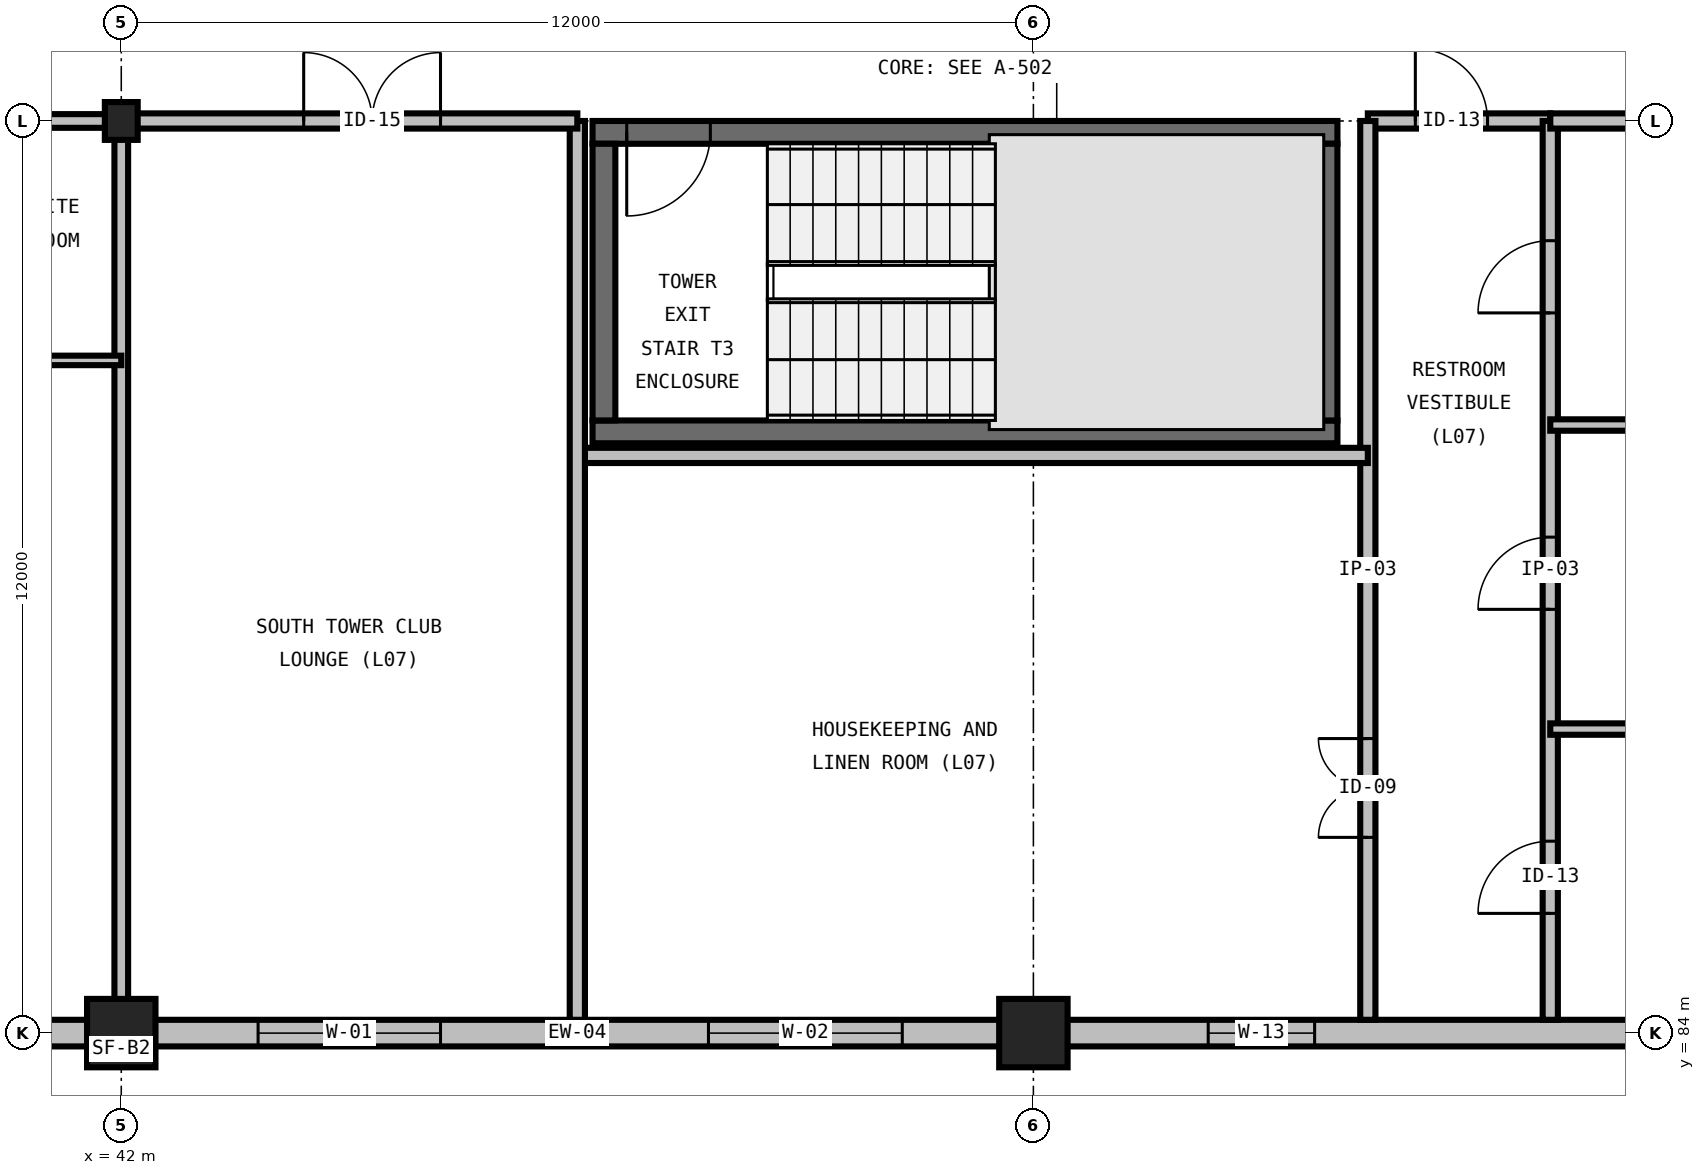
"""IFC4 building model, lengths in metres.
Left out: names, types, materials, properties, quantities, classifications, styles, units other than length and angle.
Written with IfcOpenShell. Run it as: python <this file> out.ifc"""

import sys

from ifc_helpers import new_model, si_unit, direction, frame, frame_2d, origin, origin_2d, place, context, subcontext, project, spatial, rectangle, i_section, extrude, element, fill, save


model = new_model("IFC4")
c1 = context("Model", 3, precision=1e-05, world=origin(), true_north=direction((0.0, 1.0)))
c2 = subcontext(c1, "Body", "Model", "MODEL_VIEW")
j1 = project(units=[si_unit("LENGTHUNIT", "METRE"), si_unit("PLANEANGLEUNIT", "RADIAN")], contexts=[c1])
p1 = place(None, origin())
s1 = spatial("IfcSite", under=j1, at=p1, CompositionType="ELEMENT")
p2 = place(p1, origin())
s2 = spatial("IfcBuilding", under=s1, at=p2, CompositionType="ELEMENT")
p3 = place(p2, frame((0.0, 0.0, 34.8)))
s3 = spatial("IfcBuildingStorey", under=s2, at=p3, CompositionType="ELEMENT", Elevation=34.8)
p4 = place(p3, frame((42.0, 84.0, 0.0), z_axis=(0.0, 0.0, 1.0), x_axis=(1.0, 0.0, 0.0)))
e1 = element("IfcColumn", 1, at=p4, inside=s3, PredefinedType="COLUMN", context=c2, shape_type="SweptSolid", body=[
    extrude(rectangle(XDim=0.9, YDim=0.9, at=origin_2d()), origin(), (0.0, 0.0, 1.0), 3.6),
])
p5 = place(p3, frame((42.0, 96.0, 0.0), z_axis=(0.0, 0.0, 1.0), x_axis=(1.0, 0.0, 0.0)))
e2 = element("IfcColumn", 2, at=p5, inside=s3, PredefinedType="COLUMN", context=c2, shape_type="SweptSolid", body=[
    extrude(i_section(OverallWidth=0.432, OverallDepth=0.498, WebThickness=0.056, FlangeThickness=0.089, FilletRadius=0.031, at=origin_2d()), origin(), (0.0, 0.0, 1.0), 3.6),
])
p6 = place(p3, frame((54.0, 84.0, 0.0), z_axis=(0.0, 0.0, 1.0), x_axis=(1.0, 0.0, 0.0)))
e3 = element("IfcColumn", 3, at=p6, inside=s3, PredefinedType="COLUMN", context=c2, shape_type="SweptSolid", body=[
    extrude(rectangle(XDim=0.9, YDim=0.9, at=origin_2d()), origin(), (0.0, 0.0, 1.0), 3.6),
])
p7 = place(p3, frame((48.2, 91.91, 0.0), z_axis=(0.0, 0.0, 1.0), x_axis=(1.0, 0.0, 0.0)))
e4 = element("IfcWall", 4, at=p7, inside=s3, PredefinedType="SHEAR", context=c2, shape_type="SweptSolid", body=[
    extrude(rectangle(XDim=9.8, YDim=0.3, at=frame_2d((4.9, 0.0))), origin(), (0.0, 0.0, 1.0), 3.6),
])
p8 = place(p3, frame((58.0, 95.85, 0.0), z_axis=(0.0, 0.0, 1.0), x_axis=(-1.0, 0.0, 0.0)))
e5 = element("IfcWall", 5, at=p8, inside=s3, PredefinedType="SHEAR", context=c2, shape_type="SweptSolid", body=[
    extrude(rectangle(XDim=9.8, YDim=0.3, at=frame_2d((4.9, 0.0))), origin(), (0.0, 0.0, 1.0), 3.6),
])
p9 = place(p8, frame((8.25, 0.0, 0.0)))
e6 = element("IfcOpeningElement", 6, at=p9, cuts=e5, PredefinedType="OPENING", context=c2, shape_type="SweptSolid", body=[
    extrude(rectangle(XDim=1.1, YDim=2.2, at=frame_2d((0.55, 1.1))), frame((0.0, 0.165, 0.0), z_axis=(0.0, -1.0, 0.0), x_axis=(1.0, 0.0, 0.0)), (0.0, 0.0, 1.0), 0.33),
])
for number, where, z_axis, x_axis in (
    (7, (48.35, 95.7, 0.0), (0.0, 0.0, 1.0), (0.0, -1.0, 0.0)),
    (8, (57.85, 92.06, 0.0), (0.0, 0.0, 1.0), (0.0, 1.0, 0.0)),
):
    element("IfcWall", number, at=place(p3, frame(where, z_axis=z_axis, x_axis=x_axis)), inside=s3, PredefinedType="SHEAR", context=c2, shape_type="SweptSolid", body=[
        extrude(rectangle(XDim=3.64, YDim=0.3, at=frame_2d((1.82, 0.0))), origin(), (0.0, 0.0, 1.0), 3.6),
    ])
p10 = place(p3, frame((36.0, 84.0, 0.0), z_axis=(0.0, 0.0, 1.0), x_axis=(1.0, 0.0, 0.0)))
e9 = element("IfcWall", 9, at=p10, inside=s3, PredefinedType="STANDARD", context=c2, shape_type="SweptSolid", body=[
    extrude(rectangle(XDim=6.0, YDim=0.35, at=frame_2d((3.0, 0.0))), origin(), (0.0, 0.0, 1.0), 2.486),
])
p11 = place(p10, frame((1.8, 0.0, 0.75)))
e10 = element("IfcOpeningElement", 10, at=p11, cuts=e9, PredefinedType="OPENING", context=c2, shape_type="SweptSolid", body=[
    extrude(rectangle(XDim=2.4, YDim=1.65, at=frame_2d((1.2, 0.825))), frame((0.0, 0.19, 0.0), z_axis=(0.0, -1.0, 0.0), x_axis=(1.0, 0.0, 0.0)), (0.0, 0.0, 1.0), 0.38),
])
p12 = place(p3, frame((42.0, 84.0, 0.0), z_axis=(0.0, 0.0, 1.0), x_axis=(1.0, 0.0, 0.0)))
e11 = element("IfcWall", 11, at=p12, inside=s3, PredefinedType="STANDARD", context=c2, shape_type="SweptSolid", body=[
    extrude(rectangle(XDim=12.0, YDim=0.35, at=frame_2d((6.0, 0.0))), origin(), (0.0, 0.0, 1.0), 2.486),
])
p13 = place(p12, frame((1.8, 0.0, 0.75)))
e12 = element("IfcOpeningElement", 12, at=p13, cuts=e11, PredefinedType="OPENING", context=c2, shape_type="SweptSolid", body=[
    extrude(rectangle(XDim=2.4, YDim=1.65, at=frame_2d((1.2, 0.825))), frame((0.0, 0.19, 0.0), z_axis=(0.0, -1.0, 0.0), x_axis=(1.0, 0.0, 0.0)), (0.0, 0.0, 1.0), 0.38),
])
p14 = place(p12, frame((7.725, 0.0, 0.75)))
e13 = element("IfcOpeningElement", 13, at=p14, cuts=e11, PredefinedType="OPENING", context=c2, shape_type="SweptSolid", body=[
    extrude(rectangle(XDim=2.55, YDim=1.65, at=frame_2d((1.275, 0.825))), frame((0.0, 0.19, 0.0), z_axis=(0.0, -1.0, 0.0), x_axis=(1.0, 0.0, 0.0)), (0.0, 0.0, 1.0), 0.38),
])
p15 = place(p3, frame((54.0, 84.0, 0.0), z_axis=(0.0, 0.0, 1.0), x_axis=(1.0, 0.0, 0.0)))
e14 = element("IfcWall", 14, at=p15, inside=s3, PredefinedType="STANDARD", context=c2, shape_type="SweptSolid", body=[
    extrude(rectangle(XDim=12.0, YDim=0.35, at=frame_2d((6.0, 0.0))), origin(), (0.0, 0.0, 1.0), 2.486),
])
p16 = place(p15, frame((2.3, 0.0, 1.0)))
e15 = element("IfcOpeningElement", 15, at=p16, cuts=e14, PredefinedType="OPENING", context=c2, shape_type="SweptSolid", body=[
    extrude(rectangle(XDim=1.4, YDim=1.4, at=frame_2d((0.7, 0.7))), frame((0.0, 0.19, 0.0), z_axis=(0.0, -1.0, 0.0), x_axis=(1.0, 0.0, 0.0)), (0.0, 0.0, 1.0), 0.38),
])
p17 = place(p15, frame((8.25, 0.0, 1.0)))
e16 = element("IfcOpeningElement", 16, at=p17, cuts=e14, PredefinedType="OPENING", context=c2, shape_type="SweptSolid", body=[
    extrude(rectangle(XDim=1.5, YDim=1.35, at=frame_2d((0.75, 0.675))), frame((0.0, 0.19, 0.0), z_axis=(0.0, -1.0, 0.0), x_axis=(1.0, 0.0, 0.0)), (0.0, 0.0, 1.0), 0.38),
])
p18 = place(p3, frame((58.4, 96.0, 0.0), z_axis=(0.0, 0.0, 1.0), x_axis=(1.0, 0.0, 0.0)))
e17 = element("IfcWall", 17, at=p18, inside=s3, PredefinedType="PARTITIONING", context=c2, shape_type="SweptSolid", body=[
    extrude(rectangle(XDim=2.4, YDim=0.2, at=frame_2d((1.2, 0.0))), origin(), (0.0, 0.0, 1.0), 2.359),
])
p19 = place(p18, frame((0.625, 0.0, 0.0)))
e18 = element("IfcOpeningElement", 18, at=p19, cuts=e17, PredefinedType="OPENING", context=c2, shape_type="SweptSolid", body=[
    extrude(rectangle(XDim=0.95, YDim=2.15, at=frame_2d((0.475, 1.075))), frame((0.0, 0.115, 0.0), z_axis=(0.0, -1.0, 0.0), x_axis=(1.0, 0.0, 0.0)), (0.0, 0.0, 1.0), 0.23),
])
p20 = place(p3, frame((58.4, 84.175, 0.0), z_axis=(0.0, 0.0, 1.0), x_axis=(0.0, 1.0, 0.0)))
e19 = element("IfcWall", 19, at=p20, inside=s3, PredefinedType="PARTITIONING", context=c2, shape_type="SweptSolid", body=[
    extrude(rectangle(XDim=11.825, YDim=0.2, at=frame_2d((5.913, 0.0))), origin(), (0.0, 0.0, 1.0), 3.29),
])
p21 = place(p20, frame((2.4, 0.0, 0.0)))
e20 = element("IfcOpeningElement", 20, at=p21, cuts=e19, PredefinedType="OPENING", context=c2, shape_type="SweptSolid", body=[
    extrude(rectangle(XDim=1.3, YDim=2.2, at=frame_2d((0.65, 1.1))), frame((0.0, 0.115, 0.0), z_axis=(0.0, -1.0, 0.0), x_axis=(1.0, 0.0, 0.0)), (0.0, 0.0, 1.0), 0.23),
])
p22 = place(p3, frame((60.8, 84.175, 0.0), z_axis=(0.0, 0.0, 1.0), x_axis=(0.0, 1.0, 0.0)))
e21 = element("IfcWall", 21, at=p22, inside=s3, PredefinedType="PARTITIONING", context=c2, shape_type="SweptSolid", body=[
    extrude(rectangle(XDim=11.825, YDim=0.2, at=frame_2d((5.913, 0.0))), origin(), (0.0, 0.0, 1.0), 3.29),
])
p23 = place(p22, frame((1.4, 0.0, 0.0)))
e22 = element("IfcOpeningElement", 22, at=p23, cuts=e21, PredefinedType="OPENING", context=c2, shape_type="SweptSolid", body=[
    extrude(rectangle(XDim=0.95, YDim=2.15, at=frame_2d((0.475, 1.075))), frame((0.0, 0.115, 0.0), z_axis=(0.0, -1.0, 0.0), x_axis=(1.0, 0.0, 0.0)), (0.0, 0.0, 1.0), 0.23),
])
p24 = place(p22, frame((5.4, 0.0, 0.0)))
e23 = element("IfcOpeningElement", 23, at=p24, cuts=e21, PredefinedType="OPENING", context=c2, shape_type="SweptSolid", body=[
    extrude(rectangle(XDim=0.95, YDim=2.15, at=frame_2d((0.475, 1.075))), frame((0.0, 0.115, 0.0), z_axis=(0.0, -1.0, 0.0), x_axis=(1.0, 0.0, 0.0)), (0.0, 0.0, 1.0), 0.23),
])
p25 = place(p22, frame((9.3, 0.0, 0.0)))
e24 = element("IfcOpeningElement", 24, at=p25, cuts=e21, PredefinedType="OPENING", context=c2, shape_type="SweptSolid", body=[
    extrude(rectangle(XDim=0.95, YDim=2.15, at=frame_2d((0.475, 1.075))), frame((0.0, 0.115, 0.0), z_axis=(0.0, -1.0, 0.0), x_axis=(1.0, 0.0, 0.0)), (0.0, 0.0, 1.0), 0.23),
])
p26 = place(p3, frame((60.8, 96.0, 0.0), z_axis=(0.0, 0.0, 1.0), x_axis=(1.0, 0.0, 0.0)))
e25 = element("IfcWall", 25, at=p26, inside=s3, PredefinedType="PARTITIONING", context=c2, shape_type="SweptSolid", body=[
    extrude(rectangle(XDim=5.2, YDim=0.2, at=frame_2d((2.6, 0.0))), origin(), (0.0, 0.0, 1.0), 2.359),
])
for number, where, z_axis, x_axis in (
    (26, (60.8, 88.0, 0.0), (0.0, 0.0, 1.0), (1.0, 0.0, 0.0)),
    (27, (60.8, 92.0, 0.0), (0.0, 0.0, 1.0), (1.0, 0.0, 0.0)),
):
    element("IfcWall", number, at=place(p3, frame(where, z_axis=z_axis, x_axis=x_axis)), inside=s3, PredefinedType="PARTITIONING", context=c2, shape_type="SweptSolid", body=[
        extrude(rectangle(XDim=5.2, YDim=0.15, at=frame_2d((2.6, 0.0))), origin(), (0.0, 0.0, 1.0), 3.29),
    ])
p27 = place(p3, frame((48.0, 91.6, 0.0), z_axis=(0.0, 0.0, 1.0), x_axis=(1.0, 0.0, 0.0)))
e28 = element("IfcWall", 28, at=p27, inside=s3, PredefinedType="PARTITIONING", context=c2, shape_type="SweptSolid", body=[
    extrude(rectangle(XDim=10.4, YDim=0.2, at=frame_2d((5.2, 0.0))), origin(), (0.0, 0.0, 1.0), 3.29),
])
p28 = place(p3, frame((48.0, 84.175, 0.0), z_axis=(0.0, 0.0, 1.0), x_axis=(0.0, 1.0, 0.0)))
e29 = element("IfcWall", 29, at=p28, inside=s3, PredefinedType="PARTITIONING", context=c2, shape_type="SweptSolid", body=[
    extrude(rectangle(XDim=11.825, YDim=0.2, at=frame_2d((5.913, 0.0))), origin(), (0.0, 0.0, 1.0), 3.29),
])
p29 = place(p3, frame((42.0, 96.0, 0.0), z_axis=(0.0, 0.0, 1.0), x_axis=(1.0, 0.0, 0.0)))
e30 = element("IfcWall", 30, at=p29, inside=s3, PredefinedType="PARTITIONING", context=c2, shape_type="SweptSolid", body=[
    extrude(rectangle(XDim=6.0, YDim=0.2, at=frame_2d((3.0, 0.0))), origin(), (0.0, 0.0, 1.0), 2.359),
])
p30 = place(p29, frame((2.4, 0.0, 0.0)))
e31 = element("IfcOpeningElement", 31, at=p30, cuts=e30, PredefinedType="OPENING", context=c2, shape_type="SweptSolid", body=[
    extrude(rectangle(XDim=1.8, YDim=2.3, at=frame_2d((0.9, 1.15))), frame((0.0, 0.115, 0.0), z_axis=(0.0, -1.0, 0.0), x_axis=(1.0, 0.0, 0.0)), (0.0, 0.0, 1.0), 0.23),
])
p31 = place(p3, frame((42.0, 84.175, 0.0), z_axis=(0.0, 0.0, 1.0), x_axis=(0.0, 1.0, 0.0)))
e32 = element("IfcWall", 32, at=p31, inside=s3, PredefinedType="PARTITIONING", context=c2, shape_type="SweptSolid", body=[
    extrude(rectangle(XDim=11.825, YDim=0.18, at=frame_2d((5.913, 0.0))), origin(), (0.0, 0.0, 1.0), 2.59),
])
p32 = place(p3, frame((36.0, 96.0, 0.0), z_axis=(0.0, 0.0, 1.0), x_axis=(1.0, 0.0, 0.0)))
e33 = element("IfcWall", 33, at=p32, inside=s3, PredefinedType="PARTITIONING", context=c2, shape_type="SweptSolid", body=[
    extrude(rectangle(XDim=6.0, YDim=0.18, at=frame_2d((3.0, 0.0))), origin(), (0.0, 0.0, 1.0), 2.736),
])
p33 = place(p32, frame((0.77, 0.0, 0.0)))
e34 = element("IfcOpeningElement", 34, at=p33, cuts=e33, PredefinedType="OPENING", context=c2, shape_type="SweptSolid", body=[
    extrude(rectangle(XDim=1.0, YDim=2.15, at=frame_2d((0.5, 1.075))), frame((0.0, 0.105, 0.0), z_axis=(0.0, -1.0, 0.0), x_axis=(1.0, 0.0, 0.0)), (0.0, 0.0, 1.0), 0.21),
])
p34 = place(p3, frame((39.48, 92.85, 0.0), z_axis=(0.0, 0.0, 1.0), x_axis=(1.0, 0.0, 0.0)))
e35 = element("IfcWall", 35, at=p34, inside=s3, PredefinedType="PARTITIONING", context=c2, shape_type="SweptSolid", body=[
    extrude(rectangle(XDim=2.52, YDim=0.125, at=frame_2d((1.26, 0.0))), origin(), (0.0, 0.0, 1.0), 3.29),
])
p35 = place(p9, origin())
e36 = element("IfcDoor", 36, at=p35, inside=s3, OperationType="SINGLE_SWING_RIGHT", PredefinedType="DOOR", context=c2, shape_type="SweptSolid", body=[
    extrude(rectangle(XDim=1.1, YDim=2.2, at=frame_2d((0.55, 1.1))), frame((0.0, 0.025, 0.0), z_axis=(0.0, -1.0, 0.0), x_axis=(1.0, 0.0, 0.0)), (0.0, 0.0, 1.0), 0.05),
])
fill(e6, e36)
p36 = place(p13, origin())
e37 = element("IfcWindow", 37, at=p36, inside=s3, PartitioningType="DOUBLE_PANEL_VERTICAL", PredefinedType="WINDOW", context=c2, shape_type="SweptSolid", body=[
    extrude(rectangle(XDim=2.4, YDim=1.65, at=frame_2d((1.2, 0.825))), frame((0.0, 0.03, 0.0), z_axis=(0.0, -1.0, 0.0), x_axis=(1.0, 0.0, 0.0)), (0.0, 0.0, 1.0), 0.06),
])
fill(e12, e37)
p37 = place(p14, origin())
e38 = element("IfcWindow", 38, at=p37, inside=s3, PartitioningType="DOUBLE_PANEL_VERTICAL", PredefinedType="WINDOW", context=c2, shape_type="SweptSolid", body=[
    extrude(rectangle(XDim=2.55, YDim=1.65, at=frame_2d((1.275, 0.825))), frame((0.0, 0.03, 0.0), z_axis=(0.0, -1.0, 0.0), x_axis=(1.0, 0.0, 0.0)), (0.0, 0.0, 1.0), 0.06),
])
fill(e13, e38)
p38 = place(p16, origin())
e39 = element("IfcWindow", 39, at=p38, inside=s3, PartitioningType="SINGLE_PANEL", PredefinedType="WINDOW", context=c2, shape_type="SweptSolid", body=[
    extrude(rectangle(XDim=1.4, YDim=1.4, at=frame_2d((0.7, 0.7))), frame((0.0, 0.03, 0.0), z_axis=(0.0, -1.0, 0.0), x_axis=(1.0, 0.0, 0.0)), (0.0, 0.0, 1.0), 0.06),
])
fill(e15, e39)
p39 = place(p19, origin())
e40 = element("IfcDoor", 40, at=p39, inside=s3, OperationType="SINGLE_SWING_LEFT", PredefinedType="DOOR", context=c2, shape_type="SweptSolid", body=[
    extrude(rectangle(XDim=0.95, YDim=2.15, at=frame_2d((0.475, 1.075))), frame((0.0, 0.025, 0.0), z_axis=(0.0, -1.0, 0.0), x_axis=(1.0, 0.0, 0.0)), (0.0, 0.0, 1.0), 0.05),
])
fill(e18, e40)
p40 = place(p21, origin())
e41 = element("IfcDoor", 41, at=p40, inside=s3, OperationType="DOUBLE_DOOR_SINGLE_SWING", PredefinedType="DOOR", context=c2, shape_type="SweptSolid", body=[
    extrude(rectangle(XDim=1.3, YDim=2.2, at=frame_2d((0.65, 1.1))), frame((0.0, 0.025, 0.0), z_axis=(0.0, -1.0, 0.0), x_axis=(1.0, 0.0, 0.0)), (0.0, 0.0, 1.0), 0.05),
])
fill(e20, e41)
p41 = place(p23, origin())
e42 = element("IfcDoor", 42, at=p41, inside=s3, OperationType="SINGLE_SWING_LEFT", PredefinedType="DOOR", context=c2, shape_type="SweptSolid", body=[
    extrude(rectangle(XDim=0.95, YDim=2.15, at=frame_2d((0.475, 1.075))), frame((0.0, 0.025, 0.0), z_axis=(0.0, -1.0, 0.0), x_axis=(1.0, 0.0, 0.0)), (0.0, 0.0, 1.0), 0.05),
])
fill(e22, e42)
p42 = place(p24, origin())
e43 = element("IfcDoor", 43, at=p42, inside=s3, OperationType="SINGLE_SWING_LEFT", PredefinedType="DOOR", context=c2, shape_type="SweptSolid", body=[
    extrude(rectangle(XDim=0.95, YDim=2.15, at=frame_2d((0.475, 1.075))), frame((0.0, 0.025, 0.0), z_axis=(0.0, -1.0, 0.0), x_axis=(1.0, 0.0, 0.0)), (0.0, 0.0, 1.0), 0.05),
])
fill(e23, e43)
p43 = place(p25, origin())
e44 = element("IfcDoor", 44, at=p43, inside=s3, OperationType="SINGLE_SWING_LEFT", PredefinedType="DOOR", context=c2, shape_type="SweptSolid", body=[
    extrude(rectangle(XDim=0.95, YDim=2.15, at=frame_2d((0.475, 1.075))), frame((0.0, 0.025, 0.0), z_axis=(0.0, -1.0, 0.0), x_axis=(1.0, 0.0, 0.0)), (0.0, 0.0, 1.0), 0.05),
])
fill(e24, e44)
p44 = place(p30, origin())
e45 = element("IfcDoor", 45, at=p44, inside=s3, OperationType="DOUBLE_DOOR_SINGLE_SWING", PredefinedType="DOOR", context=c2, shape_type="SweptSolid", body=[
    extrude(rectangle(XDim=1.8, YDim=2.3, at=frame_2d((0.9, 1.15))), frame((0.0, 0.025, 0.0), z_axis=(0.0, -1.0, 0.0), x_axis=(1.0, 0.0, 0.0)), (0.0, 0.0, 1.0), 0.05),
])
fill(e31, e45)
save(model, sys.argv[1])
